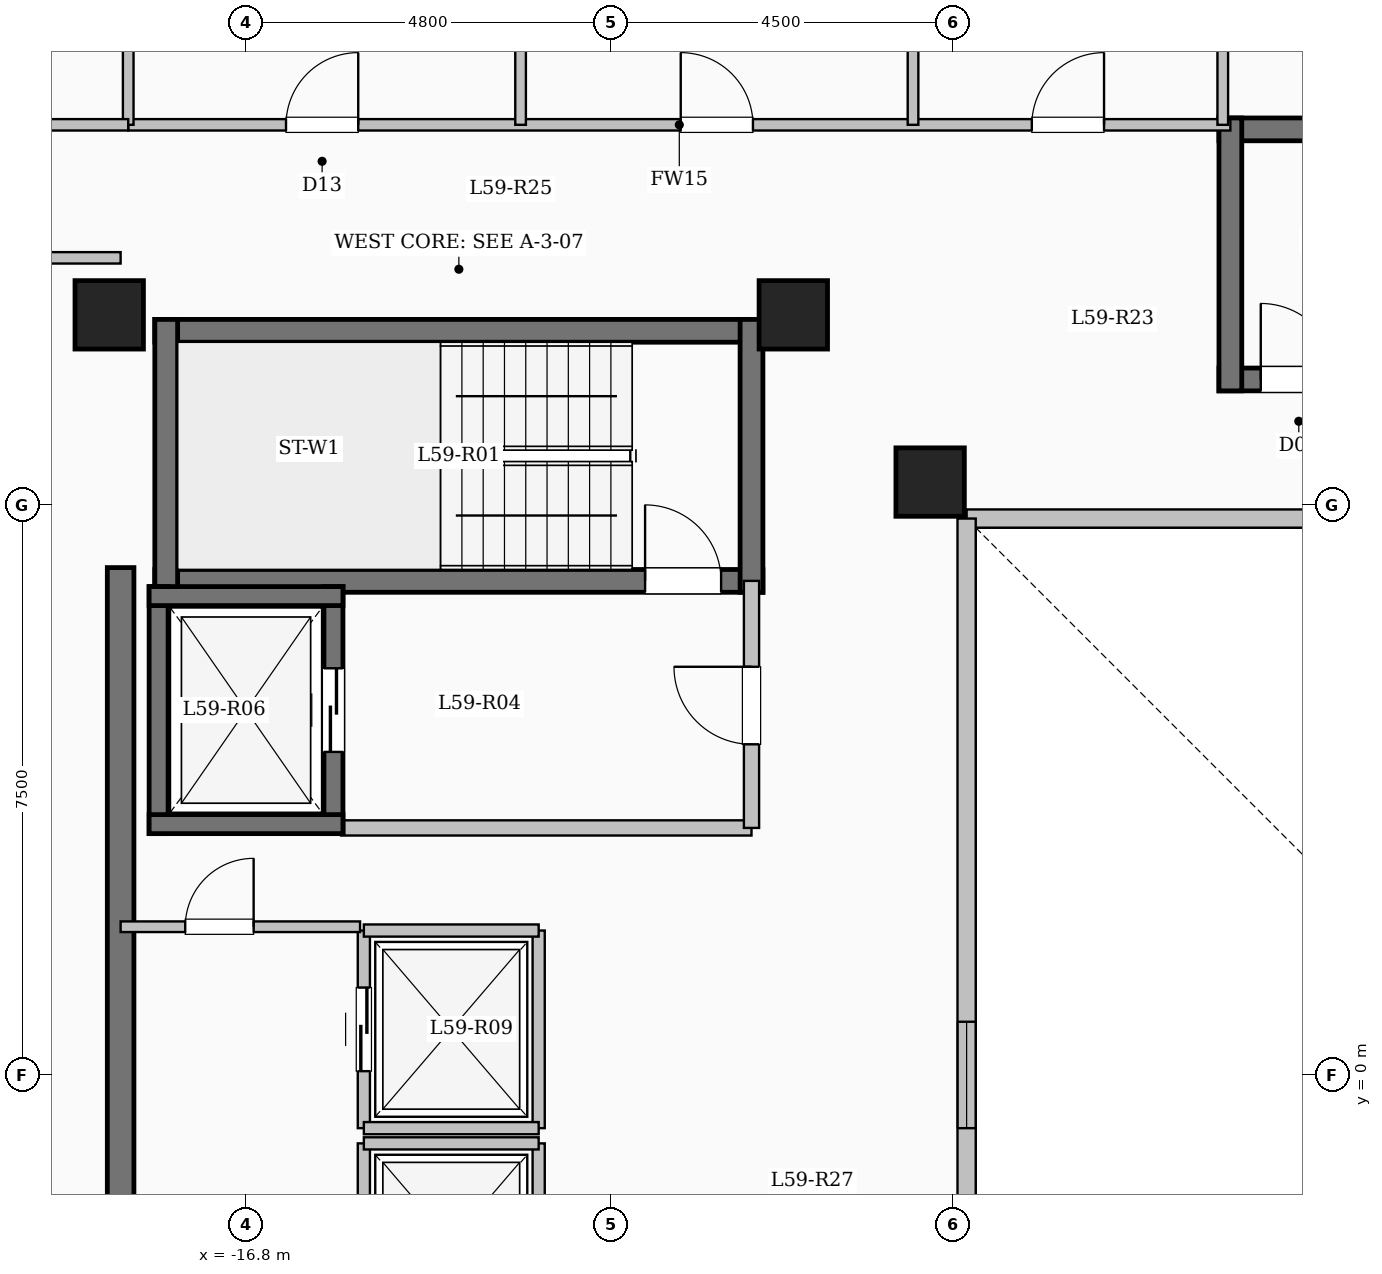
"""IFC4 building model, lengths in metres.
Left out: names, types, materials, properties, quantities, classifications, styles, units other than length and angle.
Written with IfcOpenShell. Run it as: python <this file> out.ifc"""

import sys

from ifc_helpers import new_model, si_unit, direction, frame, frame_2d, origin, origin_2d, place, context, subcontext, project, spatial, rectangle, extrude, element, fill, save


model = new_model("IFC4")
c1 = context("Model", 3, precision=1e-05, world=origin(), true_north=direction((0.0, 1.0)))
c2 = subcontext(c1, "Body", "Model", "MODEL_VIEW")
j1 = project(units=[si_unit("LENGTHUNIT", "METRE"), si_unit("PLANEANGLEUNIT", "RADIAN")], contexts=[c1])
p1 = place(None, origin())
s1 = spatial("IfcSite", under=j1, at=p1, CompositionType="ELEMENT")
p2 = place(p1, origin())
s2 = spatial("IfcBuilding", under=s1, at=p2, CompositionType="ELEMENT")
p3 = place(p2, frame((0.0, 0.0, 217.05)))
s3 = spatial("IfcBuildingStorey", under=s2, at=p3, CompositionType="ELEMENT", Elevation=217.05)
for number, where, z_axis, x_axis in (
    (1, (-7.8, 7.8, 0.0), (0.0, 0.0, 1.0), (1.0, 0.0, 0.0)),
    (2, (-9.6, 10.0, 0.0), (0.0, 0.0, 1.0), (1.0, 0.0, 0.0)),
    (3, (-18.6, 10.0, 0.0), (0.0, 0.0, 1.0), (1.0, 0.0, 0.0)),
):
    element("IfcColumn", number, at=place(p3, frame(where, z_axis=z_axis, x_axis=x_axis)), inside=s3, PredefinedType="COLUMN", context=c2, shape_type="SweptSolid", body=[
        extrude(rectangle(XDim=0.9, YDim=0.9, at=origin_2d()), origin(), (0.0, 0.0, 1.0), 3.35),
    ])
p4 = place(p3, frame((7.32, 7.32, 0.0), z_axis=(0.0, 0.0, 1.0), x_axis=(-1.0, 0.0, 0.0)))
e4 = element("IfcWall", 4, at=p4, inside=s3, PredefinedType="SOLIDWALL", context=c2, shape_type="SweptSolid", body=[
    extrude(rectangle(XDim=14.64, YDim=0.24, at=frame_2d((7.32, 0.0))), origin(), (0.0, 0.0, 1.0), 3.1),
])
p5 = place(p4, frame((6.62, 0.0, 0.95)))
e5 = element("IfcOpeningElement", 5, at=p5, cuts=e4, PredefinedType="OPENING", context=c2, shape_type="SweptSolid", body=[
    extrude(rectangle(XDim=1.4, YDim=1.5, at=frame_2d((0.7, 0.75))), frame((0.0, 0.13, 0.0), z_axis=(0.0, -1.0, 0.0), x_axis=(1.0, 0.0, 0.0)), (0.0, 0.0, 1.0), 0.26),
])
p6 = place(p3, frame((-7.32, 7.32, 0.0), z_axis=(0.0, 0.0, 1.0), x_axis=(0.0, -1.0, 0.0)))
e6 = element("IfcWall", 6, at=p6, inside=s3, PredefinedType="SOLIDWALL", context=c2, shape_type="SweptSolid", body=[
    extrude(rectangle(XDim=14.64, YDim=0.24, at=frame_2d((7.32, 0.0))), origin(), (0.0, 0.0, 1.0), 3.1),
])
p7 = place(p6, frame((6.62, 0.0, 0.95)))
e7 = element("IfcOpeningElement", 7, at=p7, cuts=e6, PredefinedType="OPENING", context=c2, shape_type="SweptSolid", body=[
    extrude(rectangle(XDim=1.4, YDim=1.5, at=frame_2d((0.7, 0.75))), frame((0.0, 0.13, 0.0), z_axis=(0.0, -1.0, 0.0), x_axis=(1.0, 0.0, 0.0)), (0.0, 0.0, 1.0), 0.26),
])
p8 = place(p3, frame((-18.0, 9.79, 0.0), z_axis=(0.0, 0.0, 1.0), x_axis=(1.0, 0.0, 0.0)))
e8 = element("IfcWall", 8, at=p8, inside=s3, PredefinedType="SHEAR", context=c2, shape_type="SweptSolid", body=[
    extrude(rectangle(XDim=8.0, YDim=0.3, at=frame_2d((4.0, 0.0))), origin(), (0.0, 0.0, 1.0), 3.35),
])
p9 = place(p3, frame((-18.0, 6.5, 0.0), z_axis=(0.0, 0.0, 1.0), x_axis=(1.0, 0.0, 0.0)))
e9 = element("IfcWall", 9, at=p9, inside=s3, PredefinedType="SHEAR", context=c2, shape_type="SweptSolid", body=[
    extrude(rectangle(XDim=8.0, YDim=0.3, at=frame_2d((4.0, 0.0))), origin(), (0.0, 0.0, 1.0), 3.35),
])
p10 = place(p9, frame((6.45, 0.0, 0.0)))
e10 = element("IfcOpeningElement", 10, at=p10, cuts=e9, PredefinedType="OPENING", context=c2, shape_type="SweptSolid", body=[
    extrude(rectangle(XDim=1.0, YDim=2.15, at=frame_2d((0.5, 1.075))), frame((0.0, 0.16, 0.0), z_axis=(0.0, -1.0, 0.0), x_axis=(1.0, 0.0, 0.0)), (0.0, 0.0, 1.0), 0.32),
])
for number, where, z_axis, x_axis in (
    (11, (-17.85, 6.35, 0.0), (0.0, 0.0, 1.0), (0.0, 1.0, 0.0)),
    (12, (-10.15, 6.35, 0.0), (0.0, 0.0, 1.0), (0.0, 1.0, 0.0)),
):
    element("IfcWall", number, at=place(p3, frame(where, z_axis=z_axis, x_axis=x_axis)), inside=s3, PredefinedType="SHEAR", context=c2, shape_type="SweptSolid", body=[
        extrude(rectangle(XDim=3.59, YDim=0.3, at=frame_2d((1.795, 0.0))), origin(), (0.0, 0.0, 1.0), 3.35),
    ])
p11 = place(p3, frame((-4.0, 12.44, 0.0), z_axis=(0.0, 0.0, 1.0), x_axis=(1.0, 0.0, 0.0)))
e13 = element("IfcWall", 13, at=p11, inside=s3, PredefinedType="SHEAR", context=c2, shape_type="SweptSolid", body=[
    extrude(rectangle(XDim=8.0, YDim=0.3, at=frame_2d((4.0, 0.0))), origin(), (0.0, 0.0, 1.0), 3.35),
])
p12 = place(p3, frame((-4.0, 9.15, 0.0), z_axis=(0.0, 0.0, 1.0), x_axis=(1.0, 0.0, 0.0)))
e14 = element("IfcWall", 14, at=p12, inside=s3, PredefinedType="SHEAR", context=c2, shape_type="SweptSolid", body=[
    extrude(rectangle(XDim=8.0, YDim=0.3, at=frame_2d((4.0, 0.0))), origin(), (0.0, 0.0, 1.0), 3.35),
])
p13 = place(p12, frame((0.55, 0.0, 0.0)))
e15 = element("IfcOpeningElement", 15, at=p13, cuts=e14, PredefinedType="OPENING", context=c2, shape_type="SweptSolid", body=[
    extrude(rectangle(XDim=1.0, YDim=2.15, at=frame_2d((0.5, 1.075))), frame((0.0, 0.16, 0.0), z_axis=(0.0, -1.0, 0.0), x_axis=(1.0, 0.0, 0.0)), (0.0, 0.0, 1.0), 0.32),
])
p14 = place(p3, frame((-3.85, 9.0, 0.0), z_axis=(0.0, 0.0, 1.0), x_axis=(0.0, 1.0, 0.0)))
e16 = element("IfcWall", 16, at=p14, inside=s3, PredefinedType="SHEAR", context=c2, shape_type="SweptSolid", body=[
    extrude(rectangle(XDim=3.59, YDim=0.3, at=frame_2d((1.795, 0.0))), origin(), (0.0, 0.0, 1.0), 3.35),
])
p15 = place(p3, frame((-15.55, 3.25, 0.0), z_axis=(0.0, 0.0, 1.0), x_axis=(1.0, 0.0, 0.0)))
e17 = element("IfcWall", 17, at=p15, inside=s3, PredefinedType="SOLIDWALL", context=c2, shape_type="SweptSolid", body=[
    extrude(rectangle(XDim=5.4, YDim=0.2, at=frame_2d((2.7, 0.0))), origin(), (0.0, 0.0, 1.0), 3.1),
])
p16 = place(p3, frame((-10.15, 3.25, 0.0), z_axis=(0.0, 0.0, 1.0), x_axis=(0.0, 1.0, 0.0)))
e18 = element("IfcWall", 18, at=p16, inside=s3, PredefinedType="SOLIDWALL", context=c2, shape_type="SweptSolid", body=[
    extrude(rectangle(XDim=3.25, YDim=0.2, at=frame_2d((1.625, 0.0))), origin(), (0.0, 0.0, 1.0), 3.1),
])
p17 = place(p16, frame((1.1, 0.0, 0.0)))
e19 = element("IfcOpeningElement", 19, at=p17, cuts=e18, PredefinedType="OPENING", context=c2, shape_type="SweptSolid", body=[
    extrude(rectangle(XDim=1.02, YDim=2.15, at=frame_2d((0.51, 1.075))), frame((0.0, 0.11, 0.0), z_axis=(0.0, -1.0, 0.0), x_axis=(1.0, 0.0, 0.0)), (0.0, 0.0, 1.0), 0.22),
])
p18 = place(p3, frame((-17.95, 3.175, 0.0), z_axis=(0.0, 0.0, 1.0), x_axis=(0.0, 1.0, 0.0)))
e20 = element("IfcWall", 20, at=p18, inside=s3, PredefinedType="SHEAR", context=c2, shape_type="SweptSolid", body=[
    extrude(rectangle(XDim=3.25, YDim=0.25, at=frame_2d((1.625, 0.0))), origin(), (0.0, 0.0, 1.0), 3.35),
])
p19 = place(p3, frame((-15.65, 3.175, 0.0), z_axis=(0.0, 0.0, 1.0), x_axis=(0.0, 1.0, 0.0)))
e21 = element("IfcWall", 21, at=p19, inside=s3, PredefinedType="SHEAR", context=c2, shape_type="SweptSolid", body=[
    extrude(rectangle(XDim=3.25, YDim=0.25, at=frame_2d((1.625, 0.0))), origin(), (0.0, 0.0, 1.0), 3.35),
])
p20 = place(p19, frame((1.075, 0.0, 0.0)))
e22 = element("IfcOpeningElement", 22, at=p20, cuts=e21, PredefinedType="OPENING", context=c2, shape_type="SweptSolid", body=[
    extrude(rectangle(XDim=1.1, YDim=2.15, at=frame_2d((0.55, 1.075))), frame((0.0, 0.135, 0.0), z_axis=(0.0, -1.0, 0.0), x_axis=(1.0, 0.0, 0.0)), (0.0, 0.0, 1.0), 0.27),
])
for number, where, z_axis, x_axis in (
    (23, (-18.075, 3.3, 0.0), (0.0, 0.0, 1.0), (1.0, 0.0, 0.0)),
    (24, (-18.075, 6.3, 0.0), (0.0, 0.0, 1.0), (1.0, 0.0, 0.0)),
):
    element("IfcWall", number, at=place(p3, frame(where, z_axis=z_axis, x_axis=x_axis)), inside=s3, PredefinedType="SHEAR", context=c2, shape_type="SweptSolid", body=[
        extrude(rectangle(XDim=2.55, YDim=0.25, at=frame_2d((1.275, 0.0))), origin(), (0.0, 0.0, 1.0), 3.35),
    ])
p21 = place(p3, frame((-15.25, -3.5, 0.0), z_axis=(0.0, 0.0, 1.0), x_axis=(0.0, 1.0, 0.0)))
e25 = element("IfcWall", 25, at=p21, inside=s3, PredefinedType="SOLIDWALL", context=c2, shape_type="SweptSolid", body=[
    extrude(rectangle(XDim=2.6, YDim=0.16, at=frame_2d((1.3, 0.0))), origin(), (0.0, 0.0, 1.0), 3.1),
])
p22 = place(p21, frame((0.75, 0.0, 0.0)))
e26 = element("IfcOpeningElement", 26, at=p22, cuts=e25, PredefinedType="OPENING", context=c2, shape_type="SweptSolid", body=[
    extrude(rectangle(XDim=1.1, YDim=2.15, at=frame_2d((0.55, 1.075))), frame((0.0, 0.09, 0.0), z_axis=(0.0, -1.0, 0.0), x_axis=(1.0, 0.0, 0.0)), (0.0, 0.0, 1.0), 0.18),
])
p23 = place(p3, frame((-12.95, -3.5, 0.0), z_axis=(0.0, 0.0, 1.0), x_axis=(0.0, 1.0, 0.0)))
e27 = element("IfcWall", 27, at=p23, inside=s3, PredefinedType="SOLIDWALL", context=c2, shape_type="SweptSolid", body=[
    extrude(rectangle(XDim=2.6, YDim=0.16, at=frame_2d((1.3, 0.0))), origin(), (0.0, 0.0, 1.0), 3.1),
])
p24 = place(p3, frame((-15.25, -0.9, 0.0), z_axis=(0.0, 0.0, 1.0), x_axis=(1.0, 0.0, 0.0)))
e28 = element("IfcWall", 28, at=p24, inside=s3, PredefinedType="SOLIDWALL", context=c2, shape_type="SweptSolid", body=[
    extrude(rectangle(XDim=2.3, YDim=0.16, at=frame_2d((1.15, 0.0))), origin(), (0.0, 0.0, 1.0), 3.1),
])
p25 = place(p3, frame((-15.25, -0.7, 0.0), z_axis=(0.0, 0.0, 1.0), x_axis=(0.0, 1.0, 0.0)))
e29 = element("IfcWall", 29, at=p25, inside=s3, PredefinedType="SOLIDWALL", context=c2, shape_type="SweptSolid", body=[
    extrude(rectangle(XDim=2.6, YDim=0.16, at=frame_2d((1.3, 0.0))), origin(), (0.0, 0.0, 1.0), 3.1),
])
p26 = place(p25, frame((0.75, 0.0, 0.0)))
e30 = element("IfcOpeningElement", 30, at=p26, cuts=e29, PredefinedType="OPENING", context=c2, shape_type="SweptSolid", body=[
    extrude(rectangle(XDim=1.1, YDim=2.15, at=frame_2d((0.55, 1.075))), frame((0.0, 0.09, 0.0), z_axis=(0.0, -1.0, 0.0), x_axis=(1.0, 0.0, 0.0)), (0.0, 0.0, 1.0), 0.18),
])
p27 = place(p3, frame((-12.95, -0.7, 0.0), z_axis=(0.0, 0.0, 1.0), x_axis=(0.0, 1.0, 0.0)))
e31 = element("IfcWall", 31, at=p27, inside=s3, PredefinedType="SOLIDWALL", context=c2, shape_type="SweptSolid", body=[
    extrude(rectangle(XDim=2.6, YDim=0.16, at=frame_2d((1.3, 0.0))), origin(), (0.0, 0.0, 1.0), 3.1),
])
for number, where, z_axis, x_axis in (
    (32, (-15.25, -0.7, 0.0), (0.0, 0.0, 1.0), (1.0, 0.0, 0.0)),
    (33, (-15.25, 1.9, 0.0), (0.0, 0.0, 1.0), (1.0, 0.0, 0.0)),
):
    element("IfcWall", number, at=place(p3, frame(where, z_axis=z_axis, x_axis=x_axis)), inside=s3, PredefinedType="SOLIDWALL", context=c2, shape_type="SweptSolid", body=[
        extrude(rectangle(XDim=2.3, YDim=0.16, at=frame_2d((1.15, 0.0))), origin(), (0.0, 0.0, 1.0), 3.1),
    ])
p28 = place(p3, frame((-18.45, -7.375, 0.0), z_axis=(0.0, 0.0, 1.0), x_axis=(0.0, 1.0, 0.0)))
e34 = element("IfcWall", 34, at=p28, inside=s3, PredefinedType="SHEAR", context=c2, shape_type="SweptSolid", body=[
    extrude(rectangle(XDim=14.05, YDim=0.35, at=frame_2d((7.025, 0.0))), origin(), (0.0, 0.0, 1.0), 3.35),
])
p29 = place(p3, frame((-18.45, 1.95, 0.0), z_axis=(0.0, 0.0, 1.0), x_axis=(1.0, 0.0, 0.0)))
e35 = element("IfcWall", 35, at=p29, inside=s3, PredefinedType="PARTITIONING", context=c2, shape_type="SweptSolid", body=[
    extrude(rectangle(XDim=3.15, YDim=0.14, at=frame_2d((1.575, 0.0))), origin(), (0.0, 0.0, 1.0), 3.1),
])
p30 = place(p29, frame((0.85, 0.0, 0.0)))
e36 = element("IfcOpeningElement", 36, at=p30, cuts=e35, PredefinedType="OPENING", context=c2, shape_type="SweptSolid", body=[
    extrude(rectangle(XDim=0.9, YDim=2.08, at=frame_2d((0.45, 1.04))), frame((0.0, 0.08, 0.0), z_axis=(0.0, -1.0, 0.0), x_axis=(1.0, 0.0, 0.0)), (0.0, 0.0, 1.0), 0.16),
])
p31 = place(p3, frame((-18.35, 12.5, 0.0), z_axis=(0.0, 0.0, 1.0), x_axis=(1.0, 0.0, 0.0)))
e37 = element("IfcWall", 37, at=p31, inside=s3, PredefinedType="PARTITIONING", context=c2, shape_type="SweptSolid", body=[
    extrude(rectangle(XDim=14.5, YDim=0.15, at=frame_2d((7.25, 0.0))), origin(), (0.0, 0.0, 1.0), 3.1),
])
p32 = place(p31, frame((2.076, 0.0, 0.0)))
e38 = element("IfcOpeningElement", 38, at=p32, cuts=e37, PredefinedType="OPENING", context=c2, shape_type="SweptSolid", body=[
    extrude(rectangle(XDim=0.95, YDim=2.15, at=frame_2d((0.475, 1.075))), frame((0.0, 0.085, 0.0), z_axis=(0.0, -1.0, 0.0), x_axis=(1.0, 0.0, 0.0)), (0.0, 0.0, 1.0), 0.17),
])
p33 = place(p31, frame((7.269, 0.0, 0.0)))
e39 = element("IfcOpeningElement", 39, at=p33, cuts=e37, PredefinedType="OPENING", context=c2, shape_type="SweptSolid", body=[
    extrude(rectangle(XDim=0.95, YDim=2.15, at=frame_2d((0.475, 1.075))), frame((0.0, 0.085, 0.0), z_axis=(0.0, -1.0, 0.0), x_axis=(1.0, 0.0, 0.0)), (0.0, 0.0, 1.0), 0.17),
])
p34 = place(p31, frame((11.888, 0.0, 0.0)))
e40 = element("IfcOpeningElement", 40, at=p34, cuts=e37, PredefinedType="OPENING", context=c2, shape_type="SweptSolid", body=[
    extrude(rectangle(XDim=0.95, YDim=2.15, at=frame_2d((0.475, 1.075))), frame((0.0, 0.085, 0.0), z_axis=(0.0, -1.0, 0.0), x_axis=(1.0, 0.0, 0.0)), (0.0, 0.0, 1.0), 0.17),
])
p35 = place(p3, frame((-3.95, 12.5, 0.0), z_axis=(0.0, 0.0, 1.0), x_axis=(0.0, 1.0, 0.0)))
e41 = element("IfcWall", 41, at=p35, inside=s3, PredefinedType="PARTITIONING", context=c2, shape_type="SweptSolid", body=[
    extrude(rectangle(XDim=8.35, YDim=0.14, at=frame_2d((4.175, 0.0))), origin(), (0.0, 0.0, 1.0), 3.1),
])
p36 = place(p35, frame((1.2, 0.0, 0.0)))
e42 = element("IfcOpeningElement", 42, at=p36, cuts=e41, PredefinedType="OPENING", context=c2, shape_type="SweptSolid", body=[
    extrude(rectangle(XDim=0.95, YDim=2.15, at=frame_2d((0.475, 1.075))), frame((0.0, 0.08, 0.0), z_axis=(0.0, -1.0, 0.0), x_axis=(1.0, 0.0, 0.0)), (0.0, 0.0, 1.0), 0.16),
])
p37 = place(p3, frame((-13.188, 12.5, 0.0), z_axis=(0.0, 0.0, 1.0), x_axis=(0.0, 1.0, 0.0)))
e43 = element("IfcWall", 43, at=p37, inside=s3, PredefinedType="PARTITIONING", context=c2, shape_type="SweptSolid", body=[
    extrude(rectangle(XDim=8.35, YDim=0.14, at=frame_2d((4.175, 0.0))), origin(), (0.0, 0.0, 1.0), 3.1),
])
p38 = place(p3, frame((-8.025, 12.5, 0.0), z_axis=(0.0, 0.0, 1.0), x_axis=(0.0, 1.0, 0.0)))
e44 = element("IfcWall", 44, at=p38, inside=s3, PredefinedType="PARTITIONING", context=c2, shape_type="SweptSolid", body=[
    extrude(rectangle(XDim=8.35, YDim=0.14, at=frame_2d((4.175, 0.0))), origin(), (0.0, 0.0, 1.0), 2.585),
])
p39 = place(p3, frame((-23.58, 10.75, 0.0), z_axis=(0.0, 0.0, 1.0), x_axis=(1.0, 0.0, 0.0)))
e45 = element("IfcWall", 45, at=p39, inside=s3, PredefinedType="PARTITIONING", context=c2, shape_type="SweptSolid", body=[
    extrude(rectangle(XDim=5.13, YDim=0.15, at=frame_2d((2.565, 0.0))), origin(), (0.0, 0.0, 1.0), 3.1),
])
p40 = place(p3, frame((-18.35, 12.5, 0.0), z_axis=(0.0, 0.0, 1.0), x_axis=(0.0, 1.0, 0.0)))
e46 = element("IfcWall", 46, at=p40, inside=s3, PredefinedType="PARTITIONING", context=c2, shape_type="SweptSolid", body=[
    extrude(rectangle(XDim=4.75, YDim=0.14, at=frame_2d((2.375, 0.0))), origin(), (0.0, 0.0, 1.0), 3.1),
])
p41 = place(p3, frame((-23.58, 12.5, 0.0), z_axis=(0.0, 0.0, 1.0), x_axis=(1.0, 0.0, 0.0)))
e47 = element("IfcWall", 47, at=p41, inside=s3, PredefinedType="PARTITIONING", context=c2, shape_type="SweptSolid", body=[
    extrude(rectangle(XDim=5.23, YDim=0.15, at=frame_2d((2.615, 0.0))), origin(), (0.0, 0.0, 1.0), 3.1),
])
p42 = place(p41, frame((2.14, 0.0, 0.0)))
e48 = element("IfcOpeningElement", 48, at=p42, cuts=e47, PredefinedType="OPENING", context=c2, shape_type="SweptSolid", body=[
    extrude(rectangle(XDim=0.95, YDim=2.15, at=frame_2d((0.475, 1.075))), frame((0.0, 0.085, 0.0), z_axis=(0.0, -1.0, 0.0), x_axis=(1.0, 0.0, 0.0)), (0.0, 0.0, 1.0), 0.17),
])
p43 = place(p7, origin())
e49 = element("IfcWindow", 49, at=p43, inside=s3, PartitioningType="SINGLE_PANEL", PredefinedType="WINDOW", context=c2, shape_type="SweptSolid", body=[
    extrude(rectangle(XDim=1.4, YDim=1.5, at=frame_2d((0.7, 0.75))), frame((0.0, 0.03, 0.0), z_axis=(0.0, -1.0, 0.0), x_axis=(1.0, 0.0, 0.0)), (0.0, 0.0, 1.0), 0.06),
])
fill(e7, e49)
p44 = place(p10, origin())
e50 = element("IfcDoor", 50, at=p44, inside=s3, OperationType="SINGLE_SWING_LEFT", PredefinedType="DOOR", context=c2, shape_type="SweptSolid", body=[
    extrude(rectangle(XDim=1.0, YDim=2.15, at=frame_2d((0.5, 1.075))), frame((0.0, 0.025, 0.0), z_axis=(0.0, -1.0, 0.0), x_axis=(1.0, 0.0, 0.0)), (0.0, 0.0, 1.0), 0.05),
])
fill(e10, e50)
p45 = place(p13, origin())
e51 = element("IfcDoor", 51, at=p45, inside=s3, OperationType="SINGLE_SWING_LEFT", PredefinedType="DOOR", context=c2, shape_type="SweptSolid", body=[
    extrude(rectangle(XDim=1.0, YDim=2.15, at=frame_2d((0.5, 1.075))), frame((0.0, 0.025, 0.0), z_axis=(0.0, -1.0, 0.0), x_axis=(1.0, 0.0, 0.0)), (0.0, 0.0, 1.0), 0.05),
])
fill(e15, e51)
p46 = place(p17, origin())
e52 = element("IfcDoor", 52, at=p46, inside=s3, OperationType="SINGLE_SWING_RIGHT", PredefinedType="DOOR", context=c2, shape_type="SweptSolid", body=[
    extrude(rectangle(XDim=1.02, YDim=2.15, at=frame_2d((0.51, 1.075))), frame((0.0, 0.025, 0.0), z_axis=(0.0, -1.0, 0.0), x_axis=(1.0, 0.0, 0.0)), (0.0, 0.0, 1.0), 0.05),
])
fill(e19, e52)
p47 = place(p20, origin())
e53 = element("IfcDoor", 53, at=p47, inside=s3, OperationType="SLIDING_TO_LEFT", PredefinedType="DOOR", context=c2, shape_type="SweptSolid", body=[
    extrude(rectangle(XDim=1.1, YDim=2.15, at=frame_2d((0.55, 1.075))), frame((0.0, 0.025, 0.0), z_axis=(0.0, -1.0, 0.0), x_axis=(1.0, 0.0, 0.0)), (0.0, 0.0, 1.0), 0.05),
])
fill(e22, e53)
p48 = place(p26, origin())
e54 = element("IfcDoor", 54, at=p48, inside=s3, OperationType="SLIDING_TO_LEFT", PredefinedType="DOOR", context=c2, shape_type="SweptSolid", body=[
    extrude(rectangle(XDim=1.1, YDim=2.15, at=frame_2d((0.55, 1.075))), frame((0.0, 0.025, 0.0), z_axis=(0.0, -1.0, 0.0), x_axis=(1.0, 0.0, 0.0)), (0.0, 0.0, 1.0), 0.05),
])
fill(e30, e54)
p49 = place(p30, origin())
e55 = element("IfcDoor", 55, at=p49, inside=s3, OperationType="SINGLE_SWING_RIGHT", PredefinedType="DOOR", context=c2, shape_type="SweptSolid", body=[
    extrude(rectangle(XDim=0.9, YDim=2.08, at=frame_2d((0.45, 1.04))), frame((0.0, 0.025, 0.0), z_axis=(0.0, -1.0, 0.0), x_axis=(1.0, 0.0, 0.0)), (0.0, 0.0, 1.0), 0.05),
])
fill(e36, e55)
p50 = place(p32, origin())
e56 = element("IfcDoor", 56, at=p50, inside=s3, OperationType="SINGLE_SWING_RIGHT", PredefinedType="DOOR", context=c2, shape_type="SweptSolid", body=[
    extrude(rectangle(XDim=0.95, YDim=2.15, at=frame_2d((0.475, 1.075))), frame((0.0, 0.025, 0.0), z_axis=(0.0, -1.0, 0.0), x_axis=(1.0, 0.0, 0.0)), (0.0, 0.0, 1.0), 0.05),
])
fill(e38, e56)
p51 = place(p33, origin())
e57 = element("IfcDoor", 57, at=p51, inside=s3, OperationType="SINGLE_SWING_LEFT", PredefinedType="DOOR", context=c2, shape_type="SweptSolid", body=[
    extrude(rectangle(XDim=0.95, YDim=2.15, at=frame_2d((0.475, 1.075))), frame((0.0, 0.025, 0.0), z_axis=(0.0, -1.0, 0.0), x_axis=(1.0, 0.0, 0.0)), (0.0, 0.0, 1.0), 0.05),
])
fill(e39, e57)
p52 = place(p34, origin())
e58 = element("IfcDoor", 58, at=p52, inside=s3, OperationType="SINGLE_SWING_RIGHT", PredefinedType="DOOR", context=c2, shape_type="SweptSolid", body=[
    extrude(rectangle(XDim=0.95, YDim=2.15, at=frame_2d((0.475, 1.075))), frame((0.0, 0.025, 0.0), z_axis=(0.0, -1.0, 0.0), x_axis=(1.0, 0.0, 0.0)), (0.0, 0.0, 1.0), 0.05),
])
fill(e40, e58)
save(model, sys.argv[1])
